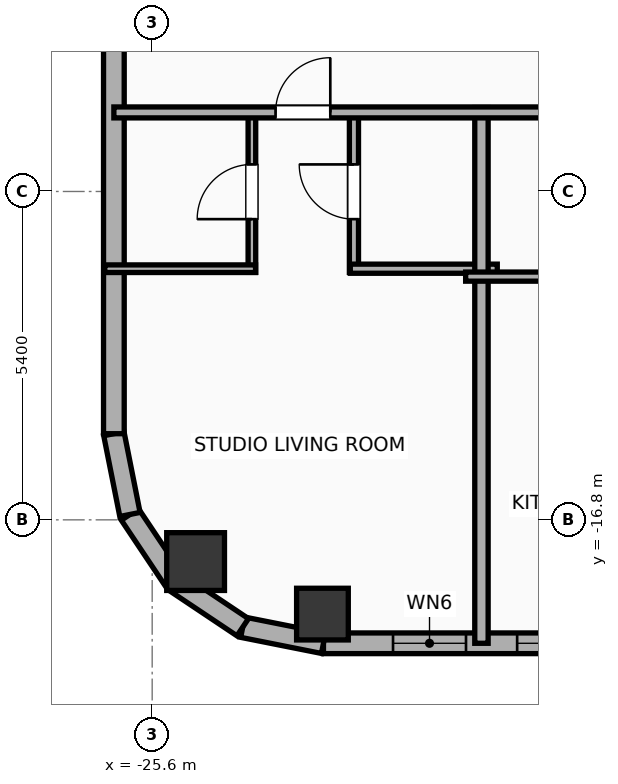
"""IFC4 building model, lengths in metres.
Left out: names, types, materials, properties, quantities, classifications, styles, units other than length and angle.
Written with IfcOpenShell. Run it as: python <this file> out.ifc"""

import sys

from ifc_helpers import new_model, si_unit, direction, frame, frame_2d, origin, origin_2d, place, context, subcontext, project, spatial, rectangle, hollow_rectangle, hollow_circle, extrude, element, fill, save


model = new_model("IFC4")
c1 = context("Model", 3, precision=1e-05, world=origin(), true_north=direction((0.0, 1.0)))
c2 = subcontext(c1, "Body", "Model", "MODEL_VIEW")
j1 = project(units=[si_unit("LENGTHUNIT", "METRE"), si_unit("PLANEANGLEUNIT", "RADIAN")], contexts=[c1])
p1 = place(None, origin())
s1 = spatial("IfcSite", under=j1, at=p1, CompositionType="ELEMENT")
p2 = place(p1, origin())
s2 = spatial("IfcBuilding", under=s1, at=p2, CompositionType="ELEMENT")
p3 = place(p2, frame((0.0, 0.0, 235.3)))
s3 = spatial("IfcBuildingStorey", under=s2, at=p3, CompositionType="ELEMENT", Elevation=235.3)
p4 = place(p3, frame((-22.8, -18.35, 0.0), z_axis=(0.0, 0.0, 1.0), x_axis=(1.0, 0.0, 0.0)))
e1 = element("IfcColumn", 1, at=p4, inside=s3, PredefinedType="COLUMN", context=c2, shape_type="SweptSolid", body=[
    extrude(hollow_rectangle(XDim=0.85, YDim=0.85, WallThickness=0.028, at=origin_2d()), origin(), (0.0, 0.0, 1.0), 3.9),
])
p5 = place(p3, frame((-24.886, -17.486, 0.0), z_axis=(0.0, 0.0, 1.0), x_axis=(1.0, 0.0, 0.0)))
e2 = element("IfcColumn", 2, at=p5, inside=s3, PredefinedType="COLUMN", context=c2, shape_type="SweptSolid", body=[
    extrude(hollow_circle(Radius=0.475, WallThickness=0.032, at=origin_2d()), origin(), (0.0, 0.0, 1.0), 3.9),
])
p6 = place(p3, frame((26.783, -18.83, 0.0), z_axis=(0.0, 0.0, 1.0), x_axis=(-1.0, 0.0, 0.0)))
e3 = element("IfcWall", 3, at=p6, inside=s3, PredefinedType="ELEMENTEDWALL", context=c2, shape_type="SweptSolid", body=[
    extrude(rectangle(XDim=49.566, YDim=0.34, at=frame_2d((24.783, 0.0))), origin(), (0.0, 0.0, 1.0), 3.65),
])
p7 = place(p6, frame((23.583, 0.0, 0.75)))
e4 = element("IfcOpeningElement", 4, at=p7, cuts=e3, PredefinedType="OPENING", context=c2, shape_type="SweptSolid", body=[
    extrude(rectangle(XDim=2.4, YDim=2.1, at=frame_2d((1.2, 1.05))), frame((0.0, 0.18, 0.0), z_axis=(0.0, -1.0, 0.0), x_axis=(1.0, 0.0, 0.0)), (0.0, 0.0, 1.0), 0.36),
])
p8 = place(p6, frame((41.756, 0.0, 0.75)))
e5 = element("IfcOpeningElement", 5, at=p8, cuts=e3, PredefinedType="OPENING", context=c2, shape_type="SweptSolid", body=[
    extrude(rectangle(XDim=2.4, YDim=2.1, at=frame_2d((1.2, 1.05))), frame((0.0, 0.18, 0.0), z_axis=(0.0, -1.0, 0.0), x_axis=(1.0, 0.0, 0.0)), (0.0, 0.0, 1.0), 0.36),
])
p9 = place(p6, frame((47.222, 0.0, 0.75)))
e6 = element("IfcOpeningElement", 6, at=p9, cuts=e3, PredefinedType="OPENING", context=c2, shape_type="SweptSolid", body=[
    extrude(rectangle(XDim=1.2, YDim=2.05, at=frame_2d((0.6, 1.025))), frame((0.0, 0.18, 0.0), z_axis=(0.0, -1.0, 0.0), x_axis=(1.0, 0.0, 0.0)), (0.0, 0.0, 1.0), 0.36),
])
p10 = place(p6, frame((45.181, 0.0, 0.75)))
e7 = element("IfcOpeningElement", 7, at=p10, cuts=e3, PredefinedType="OPENING", context=c2, shape_type="SweptSolid", body=[
    extrude(rectangle(XDim=1.2, YDim=2.05, at=frame_2d((0.6, 1.025))), frame((0.0, 0.18, 0.0), z_axis=(0.0, -1.0, 0.0), x_axis=(1.0, 0.0, 0.0)), (0.0, 0.0, 1.0), 0.36),
])
p11 = place(p6, frame((37.289, 0.0, 0.75)))
e8 = element("IfcOpeningElement", 8, at=p11, cuts=e3, PredefinedType="OPENING", context=c2, shape_type="SweptSolid", body=[
    extrude(rectangle(XDim=1.2, YDim=2.05, at=frame_2d((0.6, 1.025))), frame((0.0, 0.18, 0.0), z_axis=(0.0, -1.0, 0.0), x_axis=(1.0, 0.0, 0.0)), (0.0, 0.0, 1.0), 0.36),
])
p12 = place(p6, frame((15.715, 0.0, 0.75)))
e9 = element("IfcOpeningElement", 9, at=p12, cuts=e3, PredefinedType="OPENING", context=c2, shape_type="SweptSolid", body=[
    extrude(rectangle(XDim=1.2, YDim=2.05, at=frame_2d((0.6, 1.025))), frame((0.0, 0.18, 0.0), z_axis=(0.0, -1.0, 0.0), x_axis=(1.0, 0.0, 0.0)), (0.0, 0.0, 1.0), 0.36),
])
p13 = place(p6, frame((12.022, 0.0, 0.75)))
e10 = element("IfcOpeningElement", 10, at=p13, cuts=e3, PredefinedType="OPENING", context=c2, shape_type="SweptSolid", body=[
    extrude(rectangle(XDim=1.2, YDim=2.05, at=frame_2d((0.6, 1.025))), frame((0.0, 0.18, 0.0), z_axis=(0.0, -1.0, 0.0), x_axis=(1.0, 0.0, 0.0)), (0.0, 0.0, 1.0), 0.36),
])
p14 = place(p6, frame((8.01, 0.0, 0.75)))
e11 = element("IfcOpeningElement", 11, at=p14, cuts=e3, PredefinedType="OPENING", context=c2, shape_type="SweptSolid", body=[
    extrude(rectangle(XDim=1.2, YDim=2.05, at=frame_2d((0.6, 1.025))), frame((0.0, 0.18, 0.0), z_axis=(0.0, -1.0, 0.0), x_axis=(1.0, 0.0, 0.0)), (0.0, 0.0, 1.0), 0.36),
])
p15 = place(p6, frame((5.037, 0.0, 0.75)))
e12 = element("IfcOpeningElement", 12, at=p15, cuts=e3, PredefinedType="OPENING", context=c2, shape_type="SweptSolid", body=[
    extrude(rectangle(XDim=1.2, YDim=2.05, at=frame_2d((0.6, 1.025))), frame((0.0, 0.18, 0.0), z_axis=(0.0, -1.0, 0.0), x_axis=(1.0, 0.0, 0.0)), (0.0, 0.0, 1.0), 0.36),
])
p16 = place(p6, frame((1.811, 0.0, 0.75)))
e13 = element("IfcOpeningElement", 13, at=p16, cuts=e3, PredefinedType="OPENING", context=c2, shape_type="SweptSolid", body=[
    extrude(rectangle(XDim=1.2, YDim=2.05, at=frame_2d((0.6, 1.025))), frame((0.0, 0.18, 0.0), z_axis=(0.0, -1.0, 0.0), x_axis=(1.0, 0.0, 0.0)), (0.0, 0.0, 1.0), 0.36),
])
p17 = place(p6, frame((32.253, 0.0, 0.75)))
e14 = element("IfcOpeningElement", 14, at=p17, cuts=e3, PredefinedType="OPENING", context=c2, shape_type="SweptSolid", body=[
    extrude(rectangle(XDim=1.2, YDim=2.05, at=frame_2d((0.6, 1.025))), frame((0.0, 0.18, 0.0), z_axis=(0.0, -1.0, 0.0), x_axis=(1.0, 0.0, 0.0)), (0.0, 0.0, 1.0), 0.36),
])
p18 = place(p6, frame((27.853, 0.0, 0.75)))
e15 = element("IfcOpeningElement", 15, at=p18, cuts=e3, PredefinedType="OPENING", context=c2, shape_type="SweptSolid", body=[
    extrude(rectangle(XDim=1.2, YDim=2.05, at=frame_2d((0.6, 1.025))), frame((0.0, 0.18, 0.0), z_axis=(0.0, -1.0, 0.0), x_axis=(1.0, 0.0, 0.0)), (0.0, 0.0, 1.0), 0.36),
])
p19 = place(p6, frame((20.473, 0.0, 0.75)))
e16 = element("IfcOpeningElement", 16, at=p19, cuts=e3, PredefinedType="OPENING", context=c2, shape_type="SweptSolid", body=[
    extrude(rectangle(XDim=1.2, YDim=2.05, at=frame_2d((0.6, 1.025))), frame((0.0, 0.18, 0.0), z_axis=(0.0, -1.0, 0.0), x_axis=(1.0, 0.0, 0.0)), (0.0, 0.0, 1.0), 0.36),
])
p20 = place(p3, frame((-22.783, -18.83, 0.0), z_axis=(0.0, 0.0, 1.0), x_axis=(-0.980788153188, 0.195075878998, 0.0)))
e17 = element("IfcWall", 17, at=p20, inside=s3, PredefinedType="ELEMENTEDWALL", context=c2, shape_type="SweptSolid", body=[
    extrude(rectangle(XDim=1.354, YDim=0.34, at=frame_2d((0.677, 0.0))), origin(), (0.0, 0.0, 1.0), 3.65),
])
p21 = place(p3, frame((-24.111, -18.566, 0.0), z_axis=(0.0, 0.0, 1.0), x_axis=(-0.831403586725, 0.555669034571, 0.0)))
e18 = element("IfcWall", 18, at=p21, inside=s3, PredefinedType="ELEMENTEDWALL", context=c2, shape_type="SweptSolid", body=[
    extrude(rectangle(XDim=1.337, YDim=0.34, at=frame_2d((0.668, 0.0))), origin(), (0.0, 0.0, 1.0), 3.65),
])
p22 = place(p3, frame((-25.223, -17.823, 0.0), z_axis=(0.0, 0.0, 1.0), x_axis=(-0.555584683399, 0.831459956686, 0.0)))
e19 = element("IfcWall", 19, at=p22, inside=s3, PredefinedType="ELEMENTEDWALL", context=c2, shape_type="SweptSolid", body=[
    extrude(rectangle(XDim=1.337, YDim=0.34, at=frame_2d((0.668, 0.0))), origin(), (0.0, 0.0, 1.0), 3.65),
])
p23 = place(p3, frame((-25.966, -16.711, 0.0), z_axis=(0.0, 0.0, 1.0), x_axis=(-0.195110379894, 0.98078129043, 0.0)))
e20 = element("IfcWall", 20, at=p23, inside=s3, PredefinedType="ELEMENTEDWALL", context=c2, shape_type="SweptSolid", body=[
    extrude(rectangle(XDim=1.354, YDim=0.34, at=frame_2d((0.677, 0.0))), origin(), (0.0, 0.0, 1.0), 3.65),
])
p24 = place(p3, frame((-26.23, -15.383, 0.0), z_axis=(0.0, 0.0, 1.0), x_axis=(0.0, 1.0, 0.0)))
e21 = element("IfcWall", 21, at=p24, inside=s3, PredefinedType="ELEMENTEDWALL", context=c2, shape_type="SweptSolid", body=[
    extrude(rectangle(XDim=31.967, YDim=0.34, at=frame_2d((15.983, 0.0))), origin(), (0.0, 0.0, 1.0), 3.65),
])
p25 = place(p24, frame((29.29, 0.0, 0.75)))
e22 = element("IfcOpeningElement", 22, at=p25, cuts=e21, PredefinedType="OPENING", context=c2, shape_type="SweptSolid", body=[
    extrude(rectangle(XDim=1.2, YDim=2.05, at=frame_2d((0.6, 1.025))), frame((0.0, 0.18, 0.0), z_axis=(0.0, -1.0, 0.0), x_axis=(1.0, 0.0, 0.0)), (0.0, 0.0, 1.0), 0.36),
])
p26 = place(p24, frame((19.128, 0.0, 0.75)))
e23 = element("IfcOpeningElement", 23, at=p26, cuts=e21, PredefinedType="OPENING", context=c2, shape_type="SweptSolid", body=[
    extrude(rectangle(XDim=1.2, YDim=2.05, at=frame_2d((0.6, 1.025))), frame((0.0, 0.18, 0.0), z_axis=(0.0, -1.0, 0.0), x_axis=(1.0, 0.0, 0.0)), (0.0, 0.0, 1.0), 0.36),
])
p27 = place(p24, frame((10.578, 0.0, 0.75)))
e24 = element("IfcOpeningElement", 24, at=p27, cuts=e21, PredefinedType="OPENING", context=c2, shape_type="SweptSolid", body=[
    extrude(rectangle(XDim=1.2, YDim=2.05, at=frame_2d((0.6, 1.025))), frame((0.0, 0.18, 0.0), z_axis=(0.0, -1.0, 0.0), x_axis=(1.0, 0.0, 0.0)), (0.0, 0.0, 1.0), 0.36),
])
p28 = place(p3, frame((-23.96, -12.73, 0.0), z_axis=(0.0, 0.0, 1.0), x_axis=(0.0, 1.0, 0.0)))
e25 = element("IfcWall", 25, at=p28, inside=s3, PredefinedType="PARTITIONING", context=c2, shape_type="SweptSolid", body=[
    extrude(rectangle(XDim=2.65, YDim=0.125, at=frame_2d((1.325, 0.0))), origin(), (0.0, 0.0, 1.0), 3.65),
])
p29 = place(p28, frame((0.875, 0.0, 0.0)))
e26 = element("IfcOpeningElement", 26, at=p29, cuts=e25, PredefinedType="OPENING", context=c2, shape_type="SweptSolid", body=[
    extrude(rectangle(XDim=0.9, YDim=2.05, at=frame_2d((0.45, 1.025))), frame((0.0, 0.073, 0.0), z_axis=(0.0, -1.0, 0.0), x_axis=(1.0, 0.0, 0.0)), (0.0, 0.0, 1.0), 0.145),
])
p30 = place(p3, frame((-22.282, -12.73, 0.0), z_axis=(0.0, 0.0, 1.0), x_axis=(0.0, 1.0, 0.0)))
e27 = element("IfcWall", 27, at=p30, inside=s3, PredefinedType="PLUMBINGWALL", context=c2, shape_type="SweptSolid", body=[
    extrude(rectangle(XDim=2.65, YDim=0.15, at=frame_2d((1.325, 0.0))), origin(), (0.0, 0.0, 1.0), 3.65),
])
p31 = place(p30, frame((0.875, 0.0, 0.0)))
e28 = element("IfcOpeningElement", 28, at=p31, cuts=e27, PredefinedType="OPENING", context=c2, shape_type="SweptSolid", body=[
    extrude(rectangle(XDim=0.9, YDim=2.05, at=frame_2d((0.45, 1.025))), frame((0.0, 0.085, 0.0), z_axis=(0.0, -1.0, 0.0), x_axis=(1.0, 0.0, 0.0)), (0.0, 0.0, 1.0), 0.17),
])
p32 = place(p3, frame((-26.38, -12.67, 0.0), z_axis=(0.0, 0.0, 1.0), x_axis=(1.0, 0.0, 0.0)))
e29 = element("IfcWall", 29, at=p32, inside=s3, PredefinedType="PARTITIONING", context=c2, shape_type="SweptSolid", body=[
    extrude(rectangle(XDim=2.48, YDim=0.125, at=frame_2d((1.24, 0.0))), origin(), (0.0, 0.0, 1.0), 3.65),
])
p33 = place(p3, frame((-22.342, -12.67, 0.0), z_axis=(0.0, 0.0, 1.0), x_axis=(1.0, 0.0, 0.0)))
e30 = element("IfcWall", 30, at=p33, inside=s3, PredefinedType="PLUMBINGWALL", context=c2, shape_type="SweptSolid", body=[
    extrude(rectangle(XDim=2.417, YDim=0.15, at=frame_2d((1.208, 0.0))), origin(), (0.0, 0.0, 1.0), 3.65),
])
p34 = place(p3, frame((-20.185, -18.83, 0.0), z_axis=(0.0, 0.0, 1.0), x_axis=(0.0, 1.0, 0.0)))
e31 = element("IfcWall", 31, at=p34, inside=s3, PredefinedType="PARTITIONING", context=c2, shape_type="SweptSolid", body=[
    extrude(rectangle(XDim=8.81, YDim=0.22, at=frame_2d((4.405, 0.0))), origin(), (0.0, 0.0, 1.0), 3.09),
])
p35 = place(p3, frame((-20.445, -12.8, 0.0), z_axis=(0.0, 0.0, 1.0), x_axis=(1.0, 0.0, 0.0)))
e32 = element("IfcWall", 32, at=p35, inside=s3, PredefinedType="PLUMBINGWALL", context=c2, shape_type="SweptSolid", body=[
    extrude(rectangle(XDim=2.714, YDim=0.15, at=frame_2d((1.357, 0.0))), origin(), (0.0, 0.0, 1.0), 3.65),
])
p36 = place(p3, frame((-26.23, -10.1, 0.0), z_axis=(0.0, 0.0, 1.0), x_axis=(1.0, 0.0, 0.0)))
e33 = element("IfcWall", 33, at=p36, inside=s3, PredefinedType="PARTITIONING", context=c2, shape_type="SweptSolid", body=[
    extrude(rectangle(XDim=18.15, YDim=0.18, at=frame_2d((9.075, 0.0))), origin(), (0.0, 0.0, 1.0), 3.65),
])
p37 = place(p36, frame((2.659, 0.0, 0.0)))
e34 = element("IfcOpeningElement", 34, at=p37, cuts=e33, PredefinedType="OPENING", context=c2, shape_type="SweptSolid", body=[
    extrude(rectangle(XDim=0.9, YDim=2.05, at=frame_2d((0.45, 1.025))), frame((0.0, 0.1, 0.0), z_axis=(0.0, -1.0, 0.0), x_axis=(1.0, 0.0, 0.0)), (0.0, 0.0, 1.0), 0.2),
])
p38 = place(p36, frame((9.654, 0.0, 0.0)))
e35 = element("IfcOpeningElement", 35, at=p38, cuts=e33, PredefinedType="OPENING", context=c2, shape_type="SweptSolid", body=[
    extrude(rectangle(XDim=1.15, YDim=2.05, at=frame_2d((0.575, 1.025))), frame((0.0, 0.1, 0.0), z_axis=(0.0, -1.0, 0.0), x_axis=(1.0, 0.0, 0.0)), (0.0, 0.0, 1.0), 0.2),
])
p39 = place(p36, frame((14.792, 0.0, 0.0)))
e36 = element("IfcOpeningElement", 36, at=p39, cuts=e33, PredefinedType="OPENING", context=c2, shape_type="SweptSolid", body=[
    extrude(rectangle(XDim=0.9, YDim=2.05, at=frame_2d((0.45, 1.025))), frame((0.0, 0.1, 0.0), z_axis=(0.0, -1.0, 0.0), x_axis=(1.0, 0.0, 0.0)), (0.0, 0.0, 1.0), 0.2),
])
p40 = place(p9, origin())
e37 = element("IfcWindow", 37, at=p40, inside=s3, PartitioningType="SINGLE_PANEL", PredefinedType="WINDOW", context=c2, shape_type="SweptSolid", body=[
    extrude(rectangle(XDim=1.2, YDim=2.05, at=frame_2d((0.6, 1.025))), frame((0.0, 0.03, 0.0), z_axis=(0.0, -1.0, 0.0), x_axis=(1.0, 0.0, 0.0)), (0.0, 0.0, 1.0), 0.06),
])
fill(e6, e37)
p41 = place(p10, origin())
e38 = element("IfcWindow", 38, at=p41, inside=s3, PartitioningType="SINGLE_PANEL", PredefinedType="WINDOW", context=c2, shape_type="SweptSolid", body=[
    extrude(rectangle(XDim=1.2, YDim=2.05, at=frame_2d((0.6, 1.025))), frame((0.0, 0.03, 0.0), z_axis=(0.0, -1.0, 0.0), x_axis=(1.0, 0.0, 0.0)), (0.0, 0.0, 1.0), 0.06),
])
fill(e7, e38)
p42 = place(p29, origin())
e39 = element("IfcDoor", 39, at=p42, inside=s3, OperationType="SINGLE_SWING_LEFT", PredefinedType="DOOR", context=c2, shape_type="SweptSolid", body=[
    extrude(rectangle(XDim=0.9, YDim=2.05, at=frame_2d((0.45, 1.025))), frame((0.0, 0.025, 0.0), z_axis=(0.0, -1.0, 0.0), x_axis=(1.0, 0.0, 0.0)), (0.0, 0.0, 1.0), 0.05),
])
fill(e26, e39)
p43 = place(p31, origin())
e40 = element("IfcDoor", 40, at=p43, inside=s3, OperationType="SINGLE_SWING_RIGHT", PredefinedType="DOOR", context=c2, shape_type="SweptSolid", body=[
    extrude(rectangle(XDim=0.9, YDim=2.05, at=frame_2d((0.45, 1.025))), frame((0.0, 0.025, 0.0), z_axis=(0.0, -1.0, 0.0), x_axis=(1.0, 0.0, 0.0)), (0.0, 0.0, 1.0), 0.05),
])
fill(e28, e40)
p44 = place(p37, origin())
e41 = element("IfcDoor", 41, at=p44, inside=s3, OperationType="SINGLE_SWING_RIGHT", PredefinedType="DOOR", context=c2, shape_type="SweptSolid", body=[
    extrude(rectangle(XDim=0.9, YDim=2.05, at=frame_2d((0.45, 1.025))), frame((0.0, 0.025, 0.0), z_axis=(0.0, -1.0, 0.0), x_axis=(1.0, 0.0, 0.0)), (0.0, 0.0, 1.0), 0.05),
])
fill(e34, e41)
save(model, sys.argv[1])
